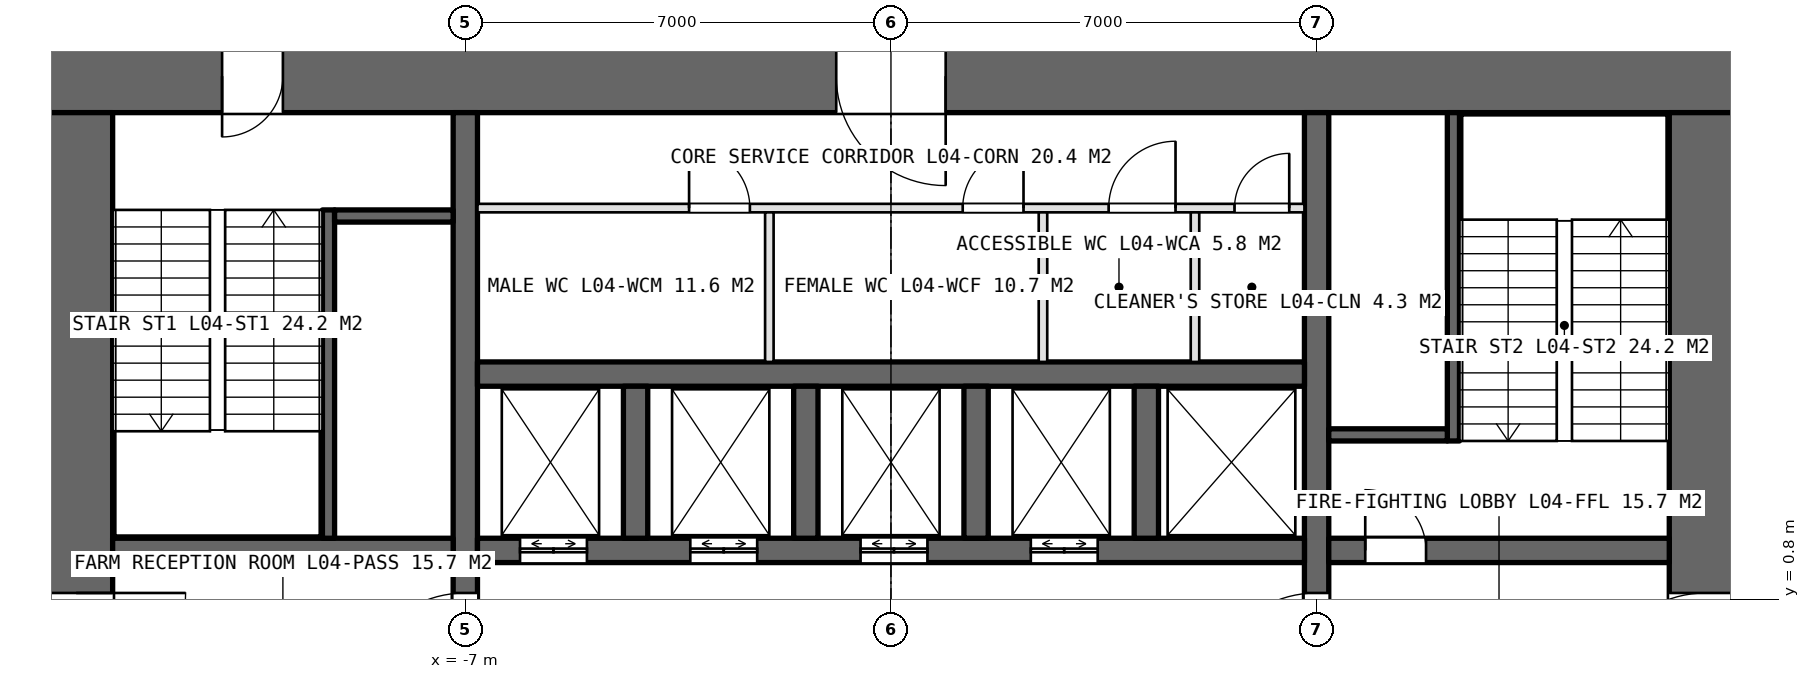
"""IFC4 building model, lengths in metres.
Left out: names, types, materials, properties, quantities, classifications, styles, units other than length and angle.
Written with IfcOpenShell. Run it as: python <this file> out.ifc"""

import sys

from ifc_helpers import new_model, si_unit, direction, frame, frame_2d, origin, place, context, subcontext, project, spatial, rectangle, extrude, element, fill, save


model = new_model("IFC4")
c1 = context("Model", 3, precision=1e-05, world=origin(), true_north=direction((0.0, 1.0)))
c2 = subcontext(c1, "Body", "Model", "MODEL_VIEW")
j1 = project(units=[si_unit("LENGTHUNIT", "METRE"), si_unit("PLANEANGLEUNIT", "RADIAN")], contexts=[c1])
p1 = place(None, origin())
s1 = spatial("IfcSite", under=j1, at=p1, CompositionType="ELEMENT")
p2 = place(p1, origin())
s2 = spatial("IfcBuilding", under=s1, at=p2, CompositionType="ELEMENT")
p3 = place(p2, frame((0.0, 0.0, 20.0)))
s3 = spatial("IfcBuildingStorey", under=s2, at=p3, CompositionType="ELEMENT", Elevation=20.0)
p4 = place(p3, frame((14.0, 9.4, 0.0), z_axis=(0.0, 0.0, 1.0), x_axis=(-1.0, 0.0, 0.0)))
e1 = element("IfcWall", 1, at=p4, inside=s3, PredefinedType="SHEAR", context=c2, shape_type="SweptSolid", body=[
    extrude(rectangle(XDim=28.0, YDim=1.2, at=frame_2d((14.0, 0.0))), origin(), (0.0, 0.0, 1.0), 5.0),
])
p5 = place(p4, frame((24.0, 0.0, 0.0)))
e2 = element("IfcOpeningElement", 2, at=p5, cuts=e1, PredefinedType="OPENING", context=c2, shape_type="SweptSolid", body=[
    extrude(rectangle(XDim=1.0, YDim=2.4, at=frame_2d((0.5, 1.2))), frame((0.0, 0.61, 0.0), z_axis=(0.0, -1.0, 0.0), x_axis=(1.0, 0.0, 0.0)), (0.0, 0.0, 1.0), 1.22),
])
p6 = place(p4, frame((13.1, 0.0, 0.0)))
e3 = element("IfcOpeningElement", 3, at=p6, cuts=e1, PredefinedType="OPENING", context=c2, shape_type="SweptSolid", body=[
    extrude(rectangle(XDim=1.8, YDim=2.4, at=frame_2d((0.9, 1.2))), frame((0.0, 0.61, 0.0), z_axis=(0.0, -1.0, 0.0), x_axis=(1.0, 0.0, 0.0)), (0.0, 0.0, 1.0), 1.22),
])
p7 = place(p3, frame((-13.4, 8.8, 0.0), z_axis=(0.0, 0.0, 1.0), x_axis=(0.0, -1.0, 0.0)))
e4 = element("IfcWall", 4, at=p7, inside=s3, PredefinedType="SHEAR", context=c2, shape_type="SweptSolid", body=[
    extrude(rectangle(XDim=17.6, YDim=1.2, at=frame_2d((8.8, 0.0))), origin(), (0.0, 0.0, 1.0), 5.0),
])
p8 = place(p7, frame((7.9, 0.0, 0.0)))
e5 = element("IfcOpeningElement", 5, at=p8, cuts=e4, PredefinedType="OPENING", context=c2, shape_type="SweptSolid", body=[
    extrude(rectangle(XDim=1.8, YDim=2.4, at=frame_2d((0.9, 1.2))), frame((0.0, 0.61, 0.0), z_axis=(0.0, -1.0, 0.0), x_axis=(1.0, 0.0, 0.0)), (0.0, 0.0, 1.0), 1.22),
])
p9 = place(p7, frame((16.5, 0.0, 0.0)))
e6 = element("IfcOpeningElement", 6, at=p9, cuts=e4, PredefinedType="OPENING", context=c2, shape_type="SweptSolid", body=[
    extrude(rectangle(XDim=1.0, YDim=2.4, at=frame_2d((0.5, 1.2))), frame((0.0, 0.61, 0.0), z_axis=(0.0, -1.0, 0.0), x_axis=(1.0, 0.0, 0.0)), (0.0, 0.0, 1.0), 1.22),
])
p10 = place(p3, frame((13.4, -8.8, 0.0), z_axis=(0.0, 0.0, 1.0), x_axis=(0.0, 1.0, 0.0)))
e7 = element("IfcWall", 7, at=p10, inside=s3, PredefinedType="SHEAR", context=c2, shape_type="SweptSolid", body=[
    extrude(rectangle(XDim=17.6, YDim=1.2, at=frame_2d((8.8, 0.0))), origin(), (0.0, 0.0, 1.0), 5.0),
])
p11 = place(p10, frame((7.9, 0.0, 0.0)))
e8 = element("IfcOpeningElement", 8, at=p11, cuts=e7, PredefinedType="OPENING", context=c2, shape_type="SweptSolid", body=[
    extrude(rectangle(XDim=1.8, YDim=2.4, at=frame_2d((0.9, 1.2))), frame((0.0, 0.61, 0.0), z_axis=(0.0, -1.0, 0.0), x_axis=(1.0, 0.0, 0.0)), (0.0, 0.0, 1.0), 1.22),
])
p12 = place(p3, frame((-7.0, -8.8, 0.0), z_axis=(0.0, 0.0, 1.0), x_axis=(0.0, 1.0, 0.0)))
e9 = element("IfcWall", 9, at=p12, inside=s3, PredefinedType="SHEAR", context=c2, shape_type="SweptSolid", body=[
    extrude(rectangle(XDim=17.6, YDim=0.4, at=frame_2d((8.8, 0.0))), origin(), (0.0, 0.0, 1.0), 5.0),
])
p13 = place(p12, frame((7.9, 0.0, 0.0)))
e10 = element("IfcOpeningElement", 10, at=p13, cuts=e9, PredefinedType="OPENING", context=c2, shape_type="SweptSolid", body=[
    extrude(rectangle(XDim=1.8, YDim=2.4, at=frame_2d((0.9, 1.2))), frame((0.0, 0.21, 0.0), z_axis=(0.0, -1.0, 0.0), x_axis=(1.0, 0.0, 0.0)), (0.0, 0.0, 1.0), 0.42),
])
p14 = place(p3, frame((7.0, -8.8, 0.0), z_axis=(0.0, 0.0, 1.0), x_axis=(0.0, 1.0, 0.0)))
e11 = element("IfcWall", 11, at=p14, inside=s3, PredefinedType="SHEAR", context=c2, shape_type="SweptSolid", body=[
    extrude(rectangle(XDim=17.6, YDim=0.4, at=frame_2d((8.8, 0.0))), origin(), (0.0, 0.0, 1.0), 5.0),
])
p15 = place(p14, frame((7.9, 0.0, 0.0)))
e12 = element("IfcOpeningElement", 12, at=p15, cuts=e11, PredefinedType="OPENING", context=c2, shape_type="SweptSolid", body=[
    extrude(rectangle(XDim=1.8, YDim=2.4, at=frame_2d((0.9, 1.2))), frame((0.0, 0.21, 0.0), z_axis=(0.0, -1.0, 0.0), x_axis=(1.0, 0.0, 0.0)), (0.0, 0.0, 1.0), 0.42),
])
p16 = place(p3, frame((-6.8, 1.6, 0.0), z_axis=(0.0, 0.0, 1.0), x_axis=(1.0, 0.0, 0.0)))
e13 = element("IfcWall", 13, at=p16, inside=s3, PredefinedType="SHEAR", context=c2, shape_type="SweptSolid", body=[
    extrude(rectangle(XDim=13.6, YDim=0.4, at=frame_2d((6.8, 0.0))), origin(), (0.0, 0.0, 1.0), 5.0),
])
p17 = place(p16, frame((0.7, 0.0, 0.0)))
e14 = element("IfcOpeningElement", 14, at=p17, cuts=e13, PredefinedType="OPENING", context=c2, shape_type="SweptSolid", body=[
    extrude(rectangle(XDim=1.1, YDim=2.4, at=frame_2d((0.55, 1.2))), frame((0.0, 0.21, 0.0), z_axis=(0.0, -1.0, 0.0), x_axis=(1.0, 0.0, 0.0)), (0.0, 0.0, 1.0), 0.42),
])
p18 = place(p16, frame((3.5, 0.0, 0.0)))
e15 = element("IfcOpeningElement", 15, at=p18, cuts=e13, PredefinedType="OPENING", context=c2, shape_type="SweptSolid", body=[
    extrude(rectangle(XDim=1.1, YDim=2.4, at=frame_2d((0.55, 1.2))), frame((0.0, 0.21, 0.0), z_axis=(0.0, -1.0, 0.0), x_axis=(1.0, 0.0, 0.0)), (0.0, 0.0, 1.0), 0.42),
])
p19 = place(p16, frame((6.3, 0.0, 0.0)))
e16 = element("IfcOpeningElement", 16, at=p19, cuts=e13, PredefinedType="OPENING", context=c2, shape_type="SweptSolid", body=[
    extrude(rectangle(XDim=1.1, YDim=2.4, at=frame_2d((0.55, 1.2))), frame((0.0, 0.21, 0.0), z_axis=(0.0, -1.0, 0.0), x_axis=(1.0, 0.0, 0.0)), (0.0, 0.0, 1.0), 0.42),
])
p20 = place(p16, frame((9.1, 0.0, 0.0)))
e17 = element("IfcOpeningElement", 17, at=p20, cuts=e13, PredefinedType="OPENING", context=c2, shape_type="SweptSolid", body=[
    extrude(rectangle(XDim=1.1, YDim=2.4, at=frame_2d((0.55, 1.2))), frame((0.0, 0.21, 0.0), z_axis=(0.0, -1.0, 0.0), x_axis=(1.0, 0.0, 0.0)), (0.0, 0.0, 1.0), 0.42),
])
p21 = place(p3, frame((-6.8, 4.5, 0.0), z_axis=(0.0, 0.0, 1.0), x_axis=(1.0, 0.0, 0.0)))
e18 = element("IfcWall", 18, at=p21, inside=s3, PredefinedType="SHEAR", context=c2, shape_type="SweptSolid", body=[
    extrude(rectangle(XDim=13.6, YDim=0.4, at=frame_2d((6.8, 0.0))), origin(), (0.0, 0.0, 1.0), 5.0),
])
p22 = place(p3, frame((-12.8, 1.6, 0.0), z_axis=(0.0, 0.0, 1.0), x_axis=(1.0, 0.0, 0.0)))
e19 = element("IfcWall", 19, at=p22, inside=s3, PredefinedType="SHEAR", context=c2, shape_type="SweptSolid", body=[
    extrude(rectangle(XDim=5.6, YDim=0.4, at=frame_2d((2.8, 0.0))), origin(), (0.0, 0.0, 1.0), 5.0),
])
p23 = place(p3, frame((7.2, 1.6, 0.0), z_axis=(0.0, 0.0, 1.0), x_axis=(1.0, 0.0, 0.0)))
e20 = element("IfcWall", 20, at=p23, inside=s3, PredefinedType="SHEAR", context=c2, shape_type="SweptSolid", body=[
    extrude(rectangle(XDim=5.6, YDim=0.4, at=frame_2d((2.8, 0.0))), origin(), (0.0, 0.0, 1.0), 5.0),
])
p24 = place(p23, frame((0.6, 0.0, 0.0)))
e21 = element("IfcOpeningElement", 21, at=p24, cuts=e20, PredefinedType="OPENING", context=c2, shape_type="SweptSolid", body=[
    extrude(rectangle(XDim=1.0, YDim=2.4, at=frame_2d((0.5, 1.2))), frame((0.0, 0.21, 0.0), z_axis=(0.0, -1.0, 0.0), x_axis=(1.0, 0.0, 0.0)), (0.0, 0.0, 1.0), 0.42),
])
for number, where, z_axis, x_axis in (
    (22, (-4.2, 1.8, 0.0), (0.0, 0.0, 1.0), (0.0, 1.0, 0.0)),
    (23, (-1.4, 1.8, 0.0), (0.0, 0.0, 1.0), (0.0, 1.0, 0.0)),
    (24, (1.4, 1.8, 0.0), (0.0, 0.0, 1.0), (0.0, 1.0, 0.0)),
    (25, (4.2, 1.8, 0.0), (0.0, 0.0, 1.0), (0.0, 1.0, 0.0)),
):
    element("IfcWall", number, at=place(p3, frame(where, z_axis=z_axis, x_axis=x_axis)), inside=s3, PredefinedType="SHEAR", context=c2, shape_type="SweptSolid", body=[
        extrude(rectangle(XDim=2.5, YDim=0.4, at=frame_2d((1.25, 0.0))), origin(), (0.0, 0.0, 1.0), 5.0),
    ])
p25 = place(p3, frame((-6.8, 7.23, 0.0), z_axis=(0.0, 0.0, 1.0), x_axis=(1.0, 0.0, 0.0)))
e26 = element("IfcWall", 26, at=p25, inside=s3, PredefinedType="PARTITIONING", context=c2, shape_type="SweptSolid", body=[
    extrude(rectangle(XDim=13.6, YDim=0.14, at=frame_2d((6.8, 0.0))), origin(), (0.0, 0.0, 1.0), 4.75),
])
p26 = place(p25, frame((3.48, 0.0, 0.0)))
e27 = element("IfcOpeningElement", 27, at=p26, cuts=e26, PredefinedType="OPENING", context=c2, shape_type="SweptSolid", body=[
    extrude(rectangle(XDim=1.0, YDim=2.4, at=frame_2d((0.5, 1.2))), frame((0.0, 0.08, 0.0), z_axis=(0.0, -1.0, 0.0), x_axis=(1.0, 0.0, 0.0)), (0.0, 0.0, 1.0), 0.16),
])
p27 = place(p25, frame((7.98, 0.0, 0.0)))
e28 = element("IfcOpeningElement", 28, at=p27, cuts=e26, PredefinedType="OPENING", context=c2, shape_type="SweptSolid", body=[
    extrude(rectangle(XDim=1.0, YDim=2.4, at=frame_2d((0.5, 1.2))), frame((0.0, 0.08, 0.0), z_axis=(0.0, -1.0, 0.0), x_axis=(1.0, 0.0, 0.0)), (0.0, 0.0, 1.0), 0.16),
])
p28 = place(p25, frame((10.38, 0.0, 0.0)))
e29 = element("IfcOpeningElement", 29, at=p28, cuts=e26, PredefinedType="OPENING", context=c2, shape_type="SweptSolid", body=[
    extrude(rectangle(XDim=1.1, YDim=2.4, at=frame_2d((0.55, 1.2))), frame((0.0, 0.08, 0.0), z_axis=(0.0, -1.0, 0.0), x_axis=(1.0, 0.0, 0.0)), (0.0, 0.0, 1.0), 0.16),
])
p29 = place(p25, frame((12.45, 0.0, 0.0)))
e30 = element("IfcOpeningElement", 30, at=p29, cuts=e26, PredefinedType="OPENING", context=c2, shape_type="SweptSolid", body=[
    extrude(rectangle(XDim=0.9, YDim=2.4, at=frame_2d((0.45, 1.2))), frame((0.0, 0.08, 0.0), z_axis=(0.0, -1.0, 0.0), x_axis=(1.0, 0.0, 0.0)), (0.0, 0.0, 1.0), 0.16),
])
for number, where, z_axis, x_axis in (
    (31, (-2.0, 4.7, 0.0), (0.0, 0.0, 1.0), (0.0, 1.0, 0.0)),
    (32, (2.5, 4.7, 0.0), (0.0, 0.0, 1.0), (0.0, 1.0, 0.0)),
    (33, (5.0, 4.7, 0.0), (0.0, 0.0, 1.0), (0.0, 1.0, 0.0)),
):
    element("IfcWall", number, at=place(p3, frame(where, z_axis=z_axis, x_axis=x_axis)), inside=s3, PredefinedType="PARTITIONING", context=c2, shape_type="SweptSolid", body=[
        extrude(rectangle(XDim=2.46, YDim=0.14, at=frame_2d((1.23, 0.0))), origin(), (0.0, 0.0, 1.0), 4.75),
    ])
p30 = place(p3, frame((-9.25, 7.2, 0.0), z_axis=(0.0, 0.0, 1.0), x_axis=(0.0, -1.0, 0.0)))
e34 = element("IfcWall", 34, at=p30, inside=s3, PredefinedType="SOLIDWALL", context=c2, shape_type="SweptSolid", body=[
    extrude(rectangle(XDim=5.4, YDim=0.2, at=frame_2d((2.7, 0.0))), origin(), (0.0, 0.0, 1.0), 5.0),
])
p31 = place(p3, frame((-9.15, 7.1, 0.0), z_axis=(0.0, 0.0, 1.0), x_axis=(1.0, 0.0, 0.0)))
e35 = element("IfcWall", 35, at=p31, inside=s3, PredefinedType="SOLIDWALL", context=c2, shape_type="SweptSolid", body=[
    extrude(rectangle(XDim=1.95, YDim=0.2, at=frame_2d((0.975, 0.0))), origin(), (0.0, 0.0, 1.0), 5.0),
])
p32 = place(p3, frame((9.25, 3.4, 0.0), z_axis=(0.0, 0.0, 1.0), x_axis=(0.0, 1.0, 0.0)))
e36 = element("IfcWall", 36, at=p32, inside=s3, PredefinedType="SOLIDWALL", context=c2, shape_type="SweptSolid", body=[
    extrude(rectangle(XDim=5.4, YDim=0.2, at=frame_2d((2.7, 0.0))), origin(), (0.0, 0.0, 1.0), 5.0),
])
p33 = place(p3, frame((9.15, 3.5, 0.0), z_axis=(0.0, 0.0, 1.0), x_axis=(-1.0, 0.0, 0.0)))
e37 = element("IfcWall", 37, at=p33, inside=s3, PredefinedType="SOLIDWALL", context=c2, shape_type="SweptSolid", body=[
    extrude(rectangle(XDim=1.95, YDim=0.2, at=frame_2d((0.975, 0.0))), origin(), (0.0, 0.0, 1.0), 5.0),
])
p34 = place(p8, origin())
e38 = element("IfcDoor", 38, at=p34, inside=s3, OperationType="DOUBLE_DOOR_SINGLE_SWING", PredefinedType="DOOR", context=c2, shape_type="SweptSolid", body=[
    extrude(rectangle(XDim=1.8, YDim=2.4, at=frame_2d((0.9, 1.2))), frame((0.0, 0.025, 0.0), z_axis=(0.0, -1.0, 0.0), x_axis=(1.0, 0.0, 0.0)), (0.0, 0.0, 1.0), 0.05),
])
fill(e5, e38)
p35 = place(p11, origin())
e39 = element("IfcDoor", 39, at=p35, inside=s3, OperationType="DOUBLE_DOOR_SINGLE_SWING", PredefinedType="DOOR", context=c2, shape_type="SweptSolid", body=[
    extrude(rectangle(XDim=1.8, YDim=2.4, at=frame_2d((0.9, 1.2))), frame((0.0, 0.025, 0.0), z_axis=(0.0, -1.0, 0.0), x_axis=(1.0, 0.0, 0.0)), (0.0, 0.0, 1.0), 0.05),
])
fill(e8, e39)
p36 = place(p13, origin())
e40 = element("IfcDoor", 40, at=p36, inside=s3, OperationType="DOUBLE_DOOR_SINGLE_SWING", PredefinedType="DOOR", context=c2, shape_type="SweptSolid", body=[
    extrude(rectangle(XDim=1.8, YDim=2.4, at=frame_2d((0.9, 1.2))), frame((0.0, 0.025, 0.0), z_axis=(0.0, -1.0, 0.0), x_axis=(1.0, 0.0, 0.0)), (0.0, 0.0, 1.0), 0.05),
])
fill(e10, e40)
p37 = place(p15, origin())
e41 = element("IfcDoor", 41, at=p37, inside=s3, OperationType="DOUBLE_DOOR_SINGLE_SWING", PredefinedType="DOOR", context=c2, shape_type="SweptSolid", body=[
    extrude(rectangle(XDim=1.8, YDim=2.4, at=frame_2d((0.9, 1.2))), frame((0.0, 0.025, 0.0), z_axis=(0.0, -1.0, 0.0), x_axis=(1.0, 0.0, 0.0)), (0.0, 0.0, 1.0), 0.05),
])
fill(e12, e41)
p38 = place(p5, origin())
e42 = element("IfcDoor", 42, at=p38, inside=s3, OperationType="SINGLE_SWING_RIGHT", PredefinedType="DOOR", context=c2, shape_type="SweptSolid", body=[
    extrude(rectangle(XDim=1.0, YDim=2.4, at=frame_2d((0.5, 1.2))), frame((0.0, 0.025, 0.0), z_axis=(0.0, -1.0, 0.0), x_axis=(1.0, 0.0, 0.0)), (0.0, 0.0, 1.0), 0.05),
])
fill(e2, e42)
p39 = place(p24, origin())
e43 = element("IfcDoor", 43, at=p39, inside=s3, OperationType="SINGLE_SWING_LEFT", PredefinedType="DOOR", context=c2, shape_type="SweptSolid", body=[
    extrude(rectangle(XDim=1.0, YDim=2.4, at=frame_2d((0.5, 1.2))), frame((0.0, 0.025, 0.0), z_axis=(0.0, -1.0, 0.0), x_axis=(1.0, 0.0, 0.0)), (0.0, 0.0, 1.0), 0.05),
])
fill(e21, e43)
p40 = place(p26, origin())
e44 = element("IfcDoor", 44, at=p40, inside=s3, OperationType="SINGLE_SWING_LEFT", PredefinedType="DOOR", context=c2, shape_type="SweptSolid", body=[
    extrude(rectangle(XDim=1.0, YDim=2.4, at=frame_2d((0.5, 1.2))), frame((0.0, 0.025, 0.0), z_axis=(0.0, -1.0, 0.0), x_axis=(1.0, 0.0, 0.0)), (0.0, 0.0, 1.0), 0.05),
])
fill(e27, e44)
p41 = place(p27, origin())
e45 = element("IfcDoor", 45, at=p41, inside=s3, OperationType="SINGLE_SWING_RIGHT", PredefinedType="DOOR", context=c2, shape_type="SweptSolid", body=[
    extrude(rectangle(XDim=1.0, YDim=2.4, at=frame_2d((0.5, 1.2))), frame((0.0, 0.025, 0.0), z_axis=(0.0, -1.0, 0.0), x_axis=(1.0, 0.0, 0.0)), (0.0, 0.0, 1.0), 0.05),
])
fill(e28, e45)
p42 = place(p28, origin())
e46 = element("IfcDoor", 46, at=p42, inside=s3, OperationType="SINGLE_SWING_RIGHT", PredefinedType="DOOR", context=c2, shape_type="SweptSolid", body=[
    extrude(rectangle(XDim=1.1, YDim=2.4, at=frame_2d((0.55, 1.2))), frame((0.0, 0.025, 0.0), z_axis=(0.0, -1.0, 0.0), x_axis=(1.0, 0.0, 0.0)), (0.0, 0.0, 1.0), 0.05),
])
fill(e29, e46)
p43 = place(p29, origin())
e47 = element("IfcDoor", 47, at=p43, inside=s3, OperationType="SINGLE_SWING_RIGHT", PredefinedType="DOOR", context=c2, shape_type="SweptSolid", body=[
    extrude(rectangle(XDim=0.9, YDim=2.4, at=frame_2d((0.45, 1.2))), frame((0.0, 0.025, 0.0), z_axis=(0.0, -1.0, 0.0), x_axis=(1.0, 0.0, 0.0)), (0.0, 0.0, 1.0), 0.05),
])
fill(e30, e47)
p44 = place(p6, origin())
e48 = element("IfcDoor", 48, at=p44, inside=s3, OperationType="DOUBLE_DOOR_SINGLE_SWING", PredefinedType="DOOR", context=c2, shape_type="SweptSolid", body=[
    extrude(rectangle(XDim=1.8, YDim=2.4, at=frame_2d((0.9, 1.2))), frame((0.0, 0.025, 0.0), z_axis=(0.0, -1.0, 0.0), x_axis=(1.0, 0.0, 0.0)), (0.0, 0.0, 1.0), 0.05),
])
fill(e3, e48)
p45 = place(p17, origin())
e49 = element("IfcDoor", 49, at=p45, inside=s3, OperationType="DOUBLE_DOOR_SLIDING", PredefinedType="DOOR", context=c2, shape_type="SweptSolid", body=[
    extrude(rectangle(XDim=1.1, YDim=2.4, at=frame_2d((0.55, 1.2))), frame((0.0, 0.025, 0.0), z_axis=(0.0, -1.0, 0.0), x_axis=(1.0, 0.0, 0.0)), (0.0, 0.0, 1.0), 0.05),
])
fill(e14, e49)
p46 = place(p18, origin())
e50 = element("IfcDoor", 50, at=p46, inside=s3, OperationType="DOUBLE_DOOR_SLIDING", PredefinedType="DOOR", context=c2, shape_type="SweptSolid", body=[
    extrude(rectangle(XDim=1.1, YDim=2.4, at=frame_2d((0.55, 1.2))), frame((0.0, 0.025, 0.0), z_axis=(0.0, -1.0, 0.0), x_axis=(1.0, 0.0, 0.0)), (0.0, 0.0, 1.0), 0.05),
])
fill(e15, e50)
p47 = place(p19, origin())
e51 = element("IfcDoor", 51, at=p47, inside=s3, OperationType="DOUBLE_DOOR_SLIDING", PredefinedType="DOOR", context=c2, shape_type="SweptSolid", body=[
    extrude(rectangle(XDim=1.1, YDim=2.4, at=frame_2d((0.55, 1.2))), frame((0.0, 0.025, 0.0), z_axis=(0.0, -1.0, 0.0), x_axis=(1.0, 0.0, 0.0)), (0.0, 0.0, 1.0), 0.05),
])
fill(e16, e51)
p48 = place(p20, origin())
e52 = element("IfcDoor", 52, at=p48, inside=s3, OperationType="DOUBLE_DOOR_SLIDING", PredefinedType="DOOR", context=c2, shape_type="SweptSolid", body=[
    extrude(rectangle(XDim=1.1, YDim=2.4, at=frame_2d((0.55, 1.2))), frame((0.0, 0.025, 0.0), z_axis=(0.0, -1.0, 0.0), x_axis=(1.0, 0.0, 0.0)), (0.0, 0.0, 1.0), 0.05),
])
fill(e17, e52)
save(model, sys.argv[1])
